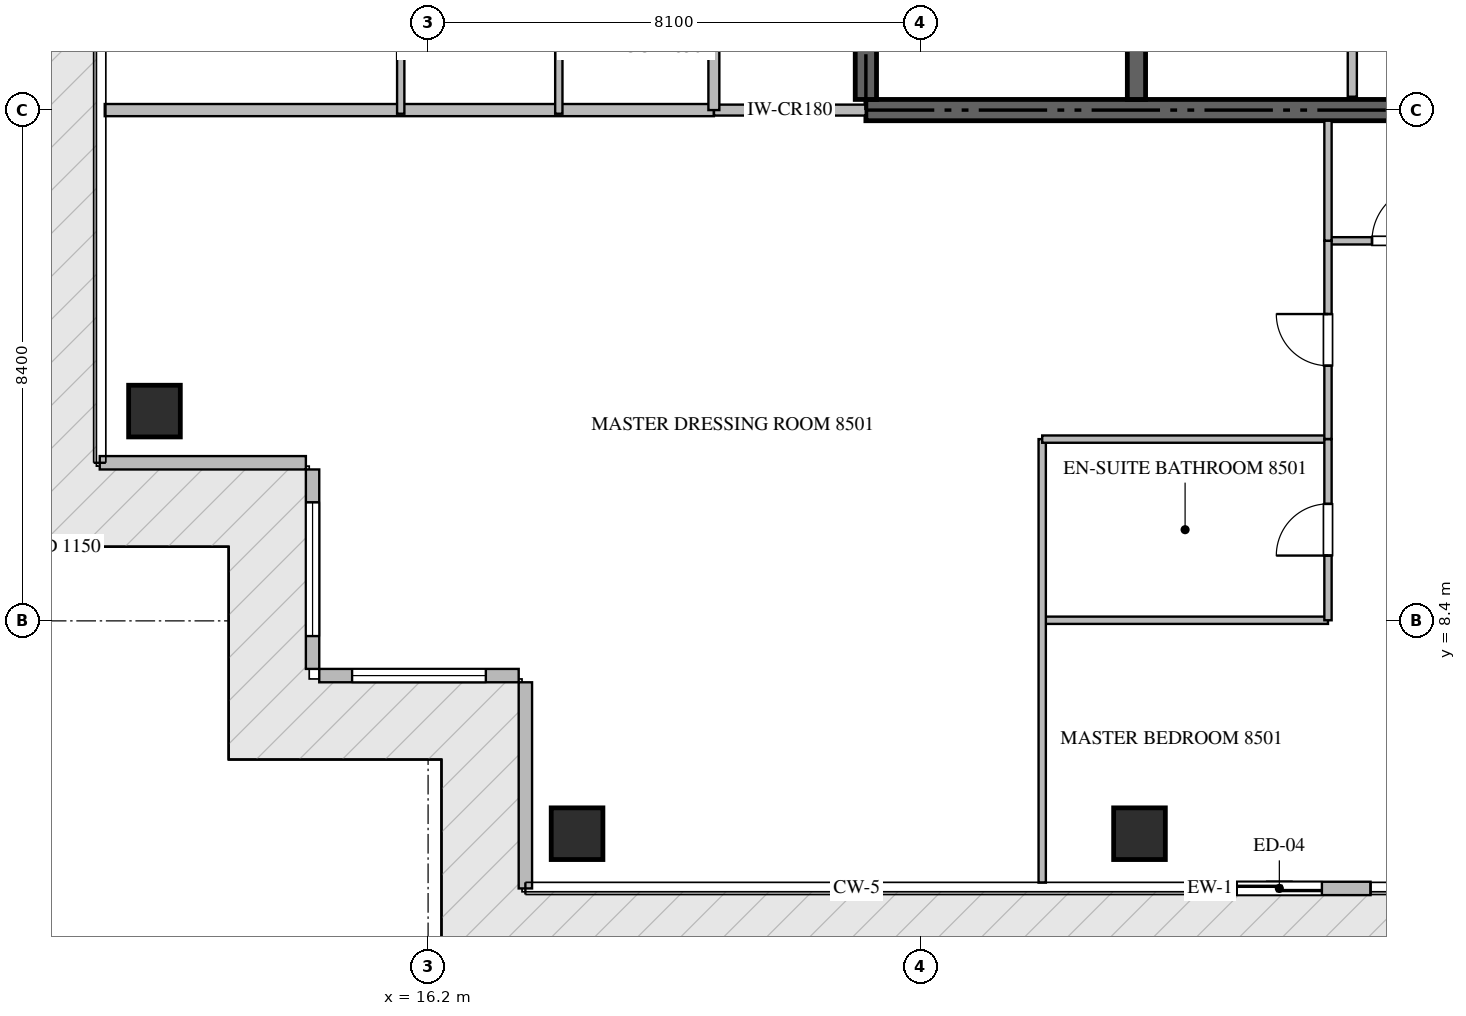
"""IFC4 building model, lengths in metres.
Left out: names, types, materials, properties, quantities, classifications, styles, units other than length and angle.
Written with IfcOpenShell. Run it as: python <this file> out.ifc"""

import sys

from ifc_helpers import new_model, si_unit, direction, frame, frame_2d, origin, origin_2d, place, context, subcontext, project, spatial, rectangle, extrude, source, transform, mapped, element, fill, save


model = new_model("IFC4")
c1 = context("Model", 3, precision=1e-05, world=origin(), true_north=direction((0.0, 1.0)))
c2 = subcontext(c1, "Body", "Model", "MODEL_VIEW")
j1 = project(units=[si_unit("LENGTHUNIT", "METRE"), si_unit("PLANEANGLEUNIT", "RADIAN")], contexts=[c1])
p1 = place(None, origin())
s1 = spatial("IfcSite", under=j1, at=p1, CompositionType="ELEMENT")
p2 = place(p1, origin())
s2 = spatial("IfcBuilding", under=s1, at=p2, CompositionType="ELEMENT")
p3 = place(p2, frame((0.0, 0.0, 342.05)))
s3 = spatial("IfcBuildingStorey", under=s2, at=p3, CompositionType="ELEMENT", Elevation=342.05)
p4 = place(p3, frame((23.4, 16.8, -0.26), z_axis=(0.0, 0.0, 1.0), x_axis=(1.0, 0.0, 0.0)))
e1 = element("IfcWall", 1, at=p4, inside=s3, PredefinedType="SHEAR", context=c2, shape_type="SweptSolid", body=[
    extrude(rectangle(XDim=18.0, YDim=0.35, at=frame_2d((9.0, 0.0))), origin(), (0.0, 0.0, 1.0), 5.898),
])
p5 = place(p3, frame((23.4, 16.975, -0.26), z_axis=(0.0, 0.0, 1.0), x_axis=(0.0, 1.0, 0.0)))
e2 = element("IfcWall", 2, at=p5, inside=s3, PredefinedType="SHEAR", context=c2, shape_type="SweptSolid", body=[
    extrude(rectangle(XDim=4.875, YDim=0.35, at=frame_2d((2.438, 0.0))), origin(), (0.0, 0.0, 1.0), 5.898),
])
p6 = place(p3, frame((27.85, 16.975, -0.26), z_axis=(0.0, 0.0, 1.0), x_axis=(0.0, 1.0, 0.0)))
e3 = element("IfcWall", 3, at=p6, inside=s3, PredefinedType="SHEAR", context=c2, shape_type="SweptSolid", body=[
    extrude(rectangle(XDim=4.875, YDim=0.3, at=frame_2d((2.438, 0.0))), origin(), (0.0, 0.0, 1.0), 5.898),
])
m1 = source(origin(), c2, "Body", "SweptSolid", [
    extrude(rectangle(XDim=0.85, YDim=0.85, at=origin_2d()), origin(), (0.0, 0.0, 1.0), 5.9),
])
for number, where, z_axis, x_axis in (
    (4, (18.65, 4.9, -0.26), (0.0, 0.0, 1.0), (1.0, 0.0, 0.0)),
    (5, (27.9, 4.9, -0.26), (0.0, 0.0, 1.0), (1.0, 0.0, 0.0)),
    (6, (11.7, 11.85, -0.26), (0.0, 0.0, 1.0), (1.0, 0.0, 0.0)),
):
    element("IfcColumn", number, at=place(p3, frame(where, z_axis=z_axis, x_axis=x_axis)), inside=s3, PredefinedType="COLUMN", context=c2, shape_type="MappedRepresentation", body=[
        mapped(m1, transform((0.0, 0.0, 0.0), scale=1.0)),
    ])
p7 = place(p3, frame((28.7, 4.0, 0.0), z_axis=(0.0, 0.0, 1.0), x_axis=(1.0, 0.0, 0.0)))
e7 = element("IfcWall", 7, at=p7, inside=s3, PredefinedType="ELEMENTEDWALL", context=c2, shape_type="SweptSolid", body=[
    extrude(rectangle(XDim=3.0, YDim=0.22, at=frame_2d((1.5, 0.0))), origin(), (0.0, 0.0, 1.0), 5.625),
])
p8 = place(p7, frame((0.8, 0.0, 0.0)))
e8 = element("IfcOpeningElement", 8, at=p8, cuts=e7, PredefinedType="OPENING", context=c2, shape_type="SweptSolid", body=[
    extrude(rectangle(XDim=1.4, YDim=2.25, at=frame_2d((0.7, 1.125))), frame((0.0, 0.12, 0.0), z_axis=(0.0, -1.0, 0.0), x_axis=(1.0, 0.0, 0.0)), (0.0, 0.0, 1.0), 0.24),
])
p9 = place(p3, frame((10.8, 11.0, 0.0), z_axis=(0.0, 0.0, 1.0), x_axis=(1.0, 0.0, 0.0)))
e9 = element("IfcWall", 9, at=p9, inside=s3, PredefinedType="ELEMENTEDWALL", context=c2, shape_type="SweptSolid", body=[
    extrude(rectangle(XDim=3.39, YDim=0.22, at=frame_2d((1.695, 0.0))), origin(), (0.0, 0.0, 1.0), 5.625),
])
p10 = place(p3, frame((14.3, 10.89, 0.0), z_axis=(0.0, 0.0, 1.0), x_axis=(0.0, -1.0, 0.0)))
e10 = element("IfcWall", 10, at=p10, inside=s3, PredefinedType="ELEMENTEDWALL", context=c2, shape_type="SweptSolid", body=[
    extrude(rectangle(XDim=3.28, YDim=0.22, at=frame_2d((1.64, 0.0))), origin(), (0.0, 0.0, 1.0), 5.625),
])
p11 = place(p10, frame((0.54, 0.0, 0.65)))
e11 = element("IfcOpeningElement", 11, at=p11, cuts=e10, PredefinedType="OPENING", context=c2, shape_type="SweptSolid", body=[
    extrude(rectangle(XDim=2.2, YDim=2.4, at=frame_2d((1.1, 1.2))), frame((0.0, 0.12, 0.0), z_axis=(0.0, -1.0, 0.0), x_axis=(1.0, 0.0, 0.0)), (0.0, 0.0, 1.0), 0.24),
])
p12 = place(p3, frame((14.41, 7.5, 0.0), z_axis=(0.0, 0.0, 1.0), x_axis=(1.0, 0.0, 0.0)))
e12 = element("IfcWall", 12, at=p12, inside=s3, PredefinedType="ELEMENTEDWALL", context=c2, shape_type="SweptSolid", body=[
    extrude(rectangle(XDim=3.28, YDim=0.22, at=frame_2d((1.64, 0.0))), origin(), (0.0, 0.0, 1.0), 5.625),
])
p13 = place(p12, frame((0.54, 0.0, 0.65)))
e13 = element("IfcOpeningElement", 13, at=p13, cuts=e12, PredefinedType="OPENING", context=c2, shape_type="SweptSolid", body=[
    extrude(rectangle(XDim=2.2, YDim=2.4, at=frame_2d((1.1, 1.2))), frame((0.0, 0.12, 0.0), z_axis=(0.0, -1.0, 0.0), x_axis=(1.0, 0.0, 0.0)), (0.0, 0.0, 1.0), 0.24),
])
p14 = place(p3, frame((17.8, 7.39, 0.0), z_axis=(0.0, 0.0, 1.0), x_axis=(0.0, -1.0, 0.0)))
e14 = element("IfcWall", 14, at=p14, inside=s3, PredefinedType="ELEMENTEDWALL", context=c2, shape_type="SweptSolid", body=[
    extrude(rectangle(XDim=3.39, YDim=0.22, at=frame_2d((1.695, 0.0))), origin(), (0.0, 0.0, 1.0), 5.625),
])
p15 = place(p3, frame((31.4, 17.02, 0.0), z_axis=(0.0, 0.0, 1.0), x_axis=(0.0, 1.0, 0.0)))
e15 = element("IfcWall", 15, at=p15, inside=s3, PredefinedType="PARTITIONING", context=c2, shape_type="SweptSolid", body=[
    extrude(rectangle(XDim=2.73, YDim=0.15, at=frame_2d((1.365, 0.0))), origin(), (0.0, 0.0, 1.0), 5.64),
])
p16 = place(p3, frame((10.882, 16.8, 0.0), z_axis=(0.0, 0.0, 1.0), x_axis=(1.0, 0.0, 0.0)))
e16 = element("IfcWall", 16, at=p16, inside=s3, PredefinedType="PARTITIONING", context=c2, shape_type="SweptSolid", body=[
    extrude(rectangle(XDim=10.018, YDim=0.2, at=frame_2d((5.009, 0.0))), origin(), (0.0, 0.0, 1.0), 5.64),
])
p17 = place(p3, frame((20.902, 16.8, 0.0), z_axis=(0.0, 0.0, 1.0), x_axis=(1.0, 0.0, 0.0)))
e17 = element("IfcWall", 17, at=p17, inside=s3, PredefinedType="PARTITIONING", context=c2, shape_type="SweptSolid", body=[
    extrude(rectangle(XDim=2.496, YDim=0.18, at=frame_2d((1.248, 0.0))), origin(), (0.0, 0.0, 1.0), 5.64),
])
p18 = place(p3, frame((20.9, 16.8, 0.0), z_axis=(0.0, 0.0, 1.0), x_axis=(0.0, 1.0, 0.0)))
e18 = element("IfcWall", 18, at=p18, inside=s3, PredefinedType="PARTITIONING", context=c2, shape_type="SweptSolid", body=[
    extrude(rectangle(XDim=16.8, YDim=0.18, at=frame_2d((8.4, 0.0))), origin(), (0.0, 0.0, 1.0), 5.64),
])
p19 = place(p18, frame((4.993, 0.0, 0.0)))
e19 = element("IfcOpeningElement", 19, at=p19, cuts=e18, PredefinedType="OPENING", context=c2, shape_type="SweptSolid", body=[
    extrude(rectangle(XDim=1.0, YDim=2.15, at=frame_2d((0.5, 1.075))), frame((0.0, 0.1, 0.0), z_axis=(0.0, -1.0, 0.0), x_axis=(1.0, 0.0, 0.0)), (0.0, 0.0, 1.0), 0.2),
])
p20 = place(p18, frame((13.351, 0.0, 0.0)))
e20 = element("IfcOpeningElement", 20, at=p20, cuts=e18, PredefinedType="OPENING", context=c2, shape_type="SweptSolid", body=[
    extrude(rectangle(XDim=1.0, YDim=2.15, at=frame_2d((0.5, 1.075))), frame((0.0, 0.1, 0.0), z_axis=(0.0, -1.0, 0.0), x_axis=(1.0, 0.0, 0.0)), (0.0, 0.0, 1.0), 0.2),
])
p21 = place(p3, frame((31.0, 14.65, 0.0), z_axis=(0.0, 0.0, 1.0), x_axis=(1.0, 0.0, 0.0)))
e21 = element("IfcWall", 21, at=p21, inside=s3, PredefinedType="PARTITIONING", context=c2, shape_type="SweptSolid", body=[
    extrude(rectangle(XDim=2.348, YDim=0.12, at=frame_2d((1.174, 0.0))), origin(), (0.0, 0.0, 1.0), 5.64),
])
p22 = place(p21, frame((0.724, 0.0, 0.0)))
e22 = element("IfcOpeningElement", 22, at=p22, cuts=e21, PredefinedType="OPENING", context=c2, shape_type="SweptSolid", body=[
    extrude(rectangle(XDim=0.9, YDim=2.1, at=frame_2d((0.45, 1.05))), frame((0.0, 0.07, 0.0), z_axis=(0.0, -1.0, 0.0), x_axis=(1.0, 0.0, 0.0)), (0.0, 0.0, 1.0), 0.14),
])
p23 = place(p3, frame((26.3, 8.41, 0.0), z_axis=(0.0, 0.0, 1.0), x_axis=(1.0, 0.0, 0.0)))
e23 = element("IfcWall", 23, at=p23, inside=s3, PredefinedType="PARTITIONING", context=c2, shape_type="SweptSolid", body=[
    extrude(rectangle(XDim=4.7, YDim=0.12, at=frame_2d((2.35, 0.0))), origin(), (0.0, 0.0, 1.0), 5.64),
])
p24 = place(p3, frame((26.3, 4.095, 0.0), z_axis=(0.0, 0.0, 1.0), x_axis=(0.0, 1.0, 0.0)))
e24 = element("IfcWall", 24, at=p24, inside=s3, PredefinedType="PARTITIONING", context=c2, shape_type="SweptSolid", body=[
    extrude(rectangle(XDim=7.294, YDim=0.12, at=frame_2d((3.647, 0.0))), origin(), (0.0, 0.0, 1.0), 5.64),
])
p25 = place(p3, frame((26.3, 11.389, 0.0), z_axis=(0.0, 0.0, 1.0), x_axis=(1.0, 0.0, 0.0)))
e25 = element("IfcWall", 25, at=p25, inside=s3, PredefinedType="PARTITIONING", context=c2, shape_type="SweptSolid", body=[
    extrude(rectangle(XDim=4.7, YDim=0.12, at=frame_2d((2.35, 0.0))), origin(), (0.0, 0.0, 1.0), 5.64),
])
p26 = place(p3, frame((31.0, 8.41, 0.0), z_axis=(0.0, 0.0, 1.0), x_axis=(0.0, 1.0, 0.0)))
e26 = element("IfcWall", 26, at=p26, inside=s3, PredefinedType="PARTITIONING", context=c2, shape_type="SweptSolid", body=[
    extrude(rectangle(XDim=2.979, YDim=0.12, at=frame_2d((1.49, 0.0))), origin(), (0.0, 0.0, 1.0), 5.64),
])
p27 = place(p26, frame((1.064, 0.0, 0.0)))
e27 = element("IfcOpeningElement", 27, at=p27, cuts=e26, PredefinedType="OPENING", context=c2, shape_type="SweptSolid", body=[
    extrude(rectangle(XDim=0.85, YDim=2.1, at=frame_2d((0.425, 1.05))), frame((0.0, 0.07, 0.0), z_axis=(0.0, -1.0, 0.0), x_axis=(1.0, 0.0, 0.0)), (0.0, 0.0, 1.0), 0.14),
])
p28 = place(p3, frame((31.0, 11.391, 0.0), z_axis=(0.0, 0.0, 1.0), x_axis=(0.0, 1.0, 0.0)))
e28 = element("IfcWall", 28, at=p28, inside=s3, PredefinedType="PARTITIONING", context=c2, shape_type="SweptSolid", body=[
    extrude(rectangle(XDim=3.259, YDim=0.12, at=frame_2d((1.629, 0.0))), origin(), (0.0, 0.0, 1.0), 5.64),
])
p29 = place(p28, frame((1.205, 0.0, 0.0)))
e29 = element("IfcOpeningElement", 29, at=p29, cuts=e28, PredefinedType="OPENING", context=c2, shape_type="SweptSolid", body=[
    extrude(rectangle(XDim=0.85, YDim=2.1, at=frame_2d((0.425, 1.05))), frame((0.0, 0.07, 0.0), z_axis=(0.0, -1.0, 0.0), x_axis=(1.0, 0.0, 0.0)), (0.0, 0.0, 1.0), 0.14),
])
p30 = place(p3, frame((31.0, 14.652, 0.0), z_axis=(0.0, 0.0, 1.0), x_axis=(0.0, 1.0, 0.0)))
e30 = element("IfcWall", 30, at=p30, inside=s3, PredefinedType="PARTITIONING", context=c2, shape_type="SweptSolid", body=[
    extrude(rectangle(XDim=1.973, YDim=0.12, at=frame_2d((0.986, 0.0))), origin(), (0.0, 0.0, 1.0), 5.64),
])
for number, where, z_axis, x_axis in (
    (31, (18.35, 16.74, 0.0), (0.0, 0.0, 1.0), (0.0, 1.0, 0.0)),
    (32, (15.75, 16.74, 0.0), (0.0, 0.0, 1.0), (0.0, 1.0, 0.0)),
):
    element("IfcWall", number, at=place(p3, frame(where, z_axis=z_axis, x_axis=x_axis)), inside=s3, PredefinedType="PARTITIONING", context=c2, shape_type="SweptSolid", body=[
        extrude(rectangle(XDim=2.66, YDim=0.12, at=frame_2d((1.33, 0.0))), origin(), (0.0, 0.0, 1.0), 5.64),
    ])
m2 = source(origin(), c2, "Body", "SweptSolid", [
    extrude(rectangle(XDim=1.4, YDim=2.25, at=frame_2d((0.7, 1.125))), frame((0.0, 0.025, 0.0), z_axis=(0.0, -1.0, 0.0), x_axis=(1.0, 0.0, 0.0)), (0.0, 0.0, 1.0), 0.05),
])
p31 = place(p8, origin())
e33 = element("IfcDoor", 33, at=p31, inside=s3, OperationType="SLIDING_TO_LEFT", PredefinedType="DOOR", context=c2, shape_type="MappedRepresentation", body=[
    mapped(m2, transform((0.0, 0.0, 0.0), scale=1.0)),
])
fill(e8, e33)
m3 = source(origin(), c2, "Body", "SweptSolid", [
    extrude(rectangle(XDim=2.2, YDim=2.4, at=frame_2d((1.1, 1.2))), frame((0.0, 0.03, 0.0), z_axis=(0.0, -1.0, 0.0), x_axis=(1.0, 0.0, 0.0)), (0.0, 0.0, 1.0), 0.06),
])
p32 = place(p11, origin())
e34 = element("IfcWindow", 34, at=p32, inside=s3, PartitioningType="SINGLE_PANEL", PredefinedType="WINDOW", context=c2, shape_type="MappedRepresentation", body=[
    mapped(m3, transform((0.0, 0.0, 0.0), scale=1.0)),
])
fill(e11, e34)
p33 = place(p13, origin())
e35 = element("IfcWindow", 35, at=p33, inside=s3, PartitioningType="SINGLE_PANEL", PredefinedType="WINDOW", context=c2, shape_type="MappedRepresentation", body=[
    mapped(m3, transform((0.0, 0.0, 0.0), scale=1.0)),
])
fill(e13, e35)
m4 = source(origin(), c2, "Body", "SweptSolid", [
    extrude(rectangle(XDim=0.9, YDim=2.1, at=frame_2d((0.45, 1.05))), frame((0.0, 0.025, 0.0), z_axis=(0.0, -1.0, 0.0), x_axis=(1.0, 0.0, 0.0)), (0.0, 0.0, 1.0), 0.05),
])
p34 = place(p22, origin())
e36 = element("IfcDoor", 36, at=p34, inside=s3, OperationType="SINGLE_SWING_RIGHT", PredefinedType="DOOR", context=c2, shape_type="MappedRepresentation", body=[
    mapped(m4, transform((0.0, 0.0, 0.0), scale=1.0)),
])
fill(e22, e36)
m5 = source(origin(), c2, "Body", "SweptSolid", [
    extrude(rectangle(XDim=0.85, YDim=2.1, at=frame_2d((0.425, 1.05))), frame((0.0, 0.025, 0.0), z_axis=(0.0, -1.0, 0.0), x_axis=(1.0, 0.0, 0.0)), (0.0, 0.0, 1.0), 0.05),
])
p35 = place(p27, origin())
e37 = element("IfcDoor", 37, at=p35, inside=s3, OperationType="SINGLE_SWING_LEFT", PredefinedType="DOOR", context=c2, shape_type="MappedRepresentation", body=[
    mapped(m5, transform((0.0, 0.0, 0.0), scale=1.0)),
])
fill(e27, e37)
p36 = place(p29, origin())
e38 = element("IfcDoor", 38, at=p36, inside=s3, OperationType="SINGLE_SWING_RIGHT", PredefinedType="DOOR", context=c2, shape_type="MappedRepresentation", body=[
    mapped(m5, transform((0.0, 0.0, 0.0), scale=1.0)),
])
fill(e29, e38)
save(model, sys.argv[1])
